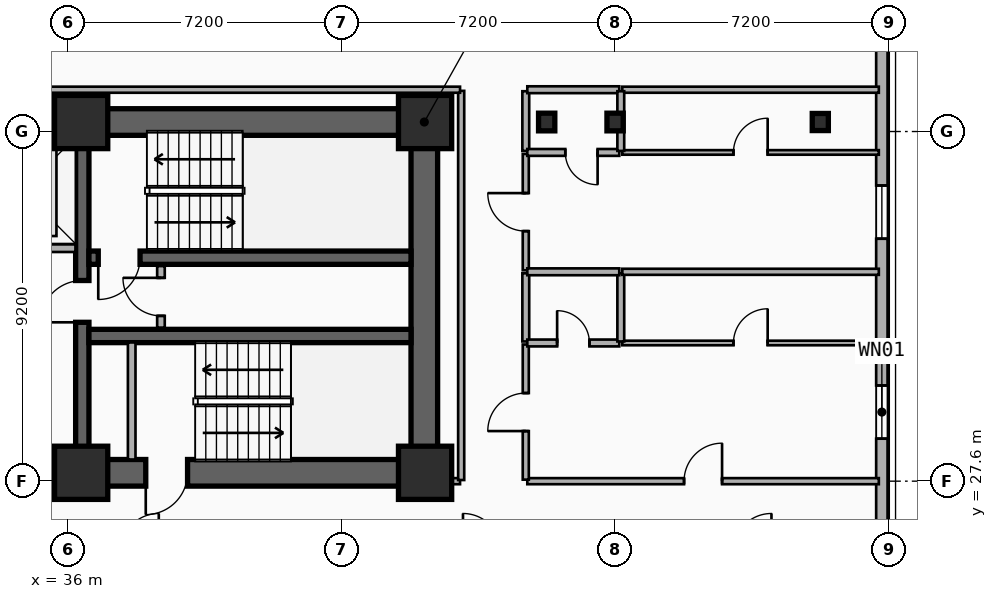
"""IFC4 building model, lengths in metres.
Left out: names, types, materials, properties, quantities, classifications, styles, units other than length and angle.
Written with IfcOpenShell. Run it as: python <this file> out.ifc"""

import sys

from ifc_helpers import new_model, si_unit, direction, frame, frame_2d, origin, origin_2d, place, context, subcontext, project, spatial, rectangle, i_section, extrude, element, fill, save


model = new_model("IFC4")
c1 = context("Model", 3, precision=1e-05, world=origin(), true_north=direction((0.0, 1.0)))
c2 = subcontext(c1, "Body", "Model", "MODEL_VIEW")
j1 = project(units=[si_unit("LENGTHUNIT", "METRE"), si_unit("PLANEANGLEUNIT", "RADIAN")], contexts=[c1])
p1 = place(None, origin())
s1 = spatial("IfcSite", under=j1, at=p1, CompositionType="ELEMENT")
p2 = place(p1, origin())
s2 = spatial("IfcBuilding", under=s1, at=p2, CompositionType="ELEMENT")
p3 = place(p2, frame((0.0, 0.0, 39.5)))
s3 = spatial("IfcBuildingStorey", under=s2, at=p3, CompositionType="ELEMENT", Elevation=39.5)
p4 = place(p3, frame((12.15, 37.05, 0.0), z_axis=(0.0, 0.0, 1.0), x_axis=(1.0, 0.0, 0.0)))
e1 = element("IfcWall", 1, at=p4, inside=s3, PredefinedType="SHEAR", context=c2, shape_type="SweptSolid", body=[
    extrude(rectangle(XDim=33.23, YDim=0.7, at=frame_2d((16.615, 0.0))), origin(), (0.0, 0.0, 1.0), 3.5),
])
p5 = place(p3, frame((45.38, 27.82, 0.0), z_axis=(0.0, 0.0, 1.0), x_axis=(-1.0, 0.0, 0.0)))
e2 = element("IfcWall", 2, at=p5, inside=s3, PredefinedType="SHEAR", context=c2, shape_type="SweptSolid", body=[
    extrude(rectangle(XDim=12.23, YDim=0.7, at=frame_2d((6.115, 0.0))), origin(), (0.0, 0.0, 1.0), 3.5),
])
p6 = place(p5, frame((9.93, 0.0, 0.0)))
e3 = element("IfcOpeningElement", 3, at=p6, cuts=e2, PredefinedType="OPENING", context=c2, shape_type="SweptSolid", body=[
    extrude(rectangle(XDim=1.1, YDim=2.15, at=frame_2d((0.55, 1.075))), frame((0.0, 0.36, 0.0), z_axis=(0.0, -1.0, 0.0), x_axis=(1.0, 0.0, 0.0)), (0.0, 0.0, 1.0), 0.72),
])
p7 = place(p5, frame((6.23, 0.0, 0.0)))
e4 = element("IfcOpeningElement", 4, at=p7, cuts=e2, PredefinedType="OPENING", context=c2, shape_type="SweptSolid", body=[
    extrude(rectangle(XDim=1.1, YDim=2.15, at=frame_2d((0.55, 1.075))), frame((0.0, 0.36, 0.0), z_axis=(0.0, -1.0, 0.0), x_axis=(1.0, 0.0, 0.0)), (0.0, 0.0, 1.0), 0.72),
])
p8 = place(p3, frame((45.38, 28.17, 0.0), z_axis=(0.0, 0.0, 1.0), x_axis=(0.0, 1.0, 0.0)))
e5 = element("IfcWall", 5, at=p8, inside=s3, PredefinedType="SHEAR", context=c2, shape_type="SweptSolid", body=[
    extrude(rectangle(XDim=8.53, YDim=0.7, at=frame_2d((4.265, 0.0))), origin(), (0.0, 0.0, 1.0), 3.5),
])
p9 = place(p3, frame((36.38, 28.17, 0.0), z_axis=(0.0, 0.0, 1.0), x_axis=(0.0, 1.0, 0.0)))
e6 = element("IfcWall", 6, at=p9, inside=s3, PredefinedType="SHEAR", context=c2, shape_type="SweptSolid", body=[
    extrude(rectangle(XDim=8.53, YDim=0.35, at=frame_2d((4.265, 0.0))), origin(), (0.0, 0.0, 1.0), 3.5),
])
p10 = place(p9, frame((3.61, 0.0, 0.0)))
e7 = element("IfcOpeningElement", 7, at=p10, cuts=e6, PredefinedType="OPENING", context=c2, shape_type="SweptSolid", body=[
    extrude(rectangle(XDim=1.1, YDim=2.15, at=frame_2d((0.55, 1.075))), frame((0.0, 0.185, 0.0), z_axis=(0.0, -1.0, 0.0), x_axis=(1.0, 0.0, 0.0)), (0.0, 0.0, 1.0), 0.37),
])
p11 = place(p3, frame((45.03, 33.48, 0.0), z_axis=(0.0, 0.0, 1.0), x_axis=(-1.0, 0.0, 0.0)))
e8 = element("IfcWall", 8, at=p11, inside=s3, PredefinedType="SHEAR", context=c2, shape_type="SweptSolid", body=[
    extrude(rectangle(XDim=8.475, YDim=0.35, at=frame_2d((4.238, 0.0))), origin(), (0.0, 0.0, 1.0), 3.5),
])
p12 = place(p11, frame((7.13, 0.0, 0.0)))
e9 = element("IfcOpeningElement", 9, at=p12, cuts=e8, PredefinedType="OPENING", context=c2, shape_type="SweptSolid", body=[
    extrude(rectangle(XDim=1.1, YDim=2.15, at=frame_2d((0.55, 1.075))), frame((0.0, 0.185, 0.0), z_axis=(0.0, -1.0, 0.0), x_axis=(1.0, 0.0, 0.0)), (0.0, 0.0, 1.0), 0.37),
])
p13 = place(p3, frame((36.555, 31.42, 0.0), z_axis=(0.0, 0.0, 1.0), x_axis=(1.0, 0.0, 0.0)))
e10 = element("IfcWall", 10, at=p13, inside=s3, PredefinedType="SHEAR", context=c2, shape_type="SweptSolid", body=[
    extrude(rectangle(XDim=8.475, YDim=0.35, at=frame_2d((4.238, 0.0))), origin(), (0.0, 0.0, 1.0), 3.5),
])
for number, where, z_axis, x_axis in (
    (11, (36.35, 27.82, 0.0), (0.0, 0.0, 1.0), (1.0, 0.0, 0.0)),
    (12, (36.35, 37.05, 0.0), (0.0, 0.0, 1.0), (1.0, 0.0, 0.0)),
    (13, (45.4, 27.82, 0.0), (0.0, 0.0, 1.0), (1.0, 0.0, 0.0)),
    (14, (45.4, 37.05, 0.0), (0.0, 0.0, 1.0), (1.0, 0.0, 0.0)),
):
    element("IfcColumn", number, at=place(p3, frame(where, z_axis=z_axis, x_axis=x_axis)), inside=s3, PredefinedType="COLUMN", context=c2, shape_type="SweptSolid", body=[
        extrude(rectangle(XDim=1.4, YDim=1.4, at=origin_2d()), origin(), (0.0, 0.0, 1.0), 3.5),
    ])
for number, where, z_axis, x_axis in (
    (15, (48.6, 37.05, 0.0), (0.0, 0.0, 1.0), (1.0, 0.0, 0.0)),
    (16, (50.4, 37.05, 0.0), (0.0, 0.0, 1.0), (1.0, 0.0, 0.0)),
):
    element("IfcColumn", number, at=place(p3, frame(where, z_axis=z_axis, x_axis=x_axis)), inside=s3, PredefinedType="COLUMN", context=c2, shape_type="SweptSolid", body=[
        extrude(i_section(OverallWidth=0.428, OverallDepth=0.465, WebThickness=0.045, FlangeThickness=0.073, FilletRadius=0.015, at=origin_2d()), origin(), (0.0, 0.0, 1.0), 3.5),
    ])
p14 = place(p3, frame((55.8, 37.05, 0.0), z_axis=(0.0, 0.0, 1.0), x_axis=(1.0, 0.0, 0.0)))
e17 = element("IfcColumn", 17, at=p14, inside=s3, PredefinedType="COLUMN", context=c2, shape_type="SweptSolid", body=[
    extrude(i_section(OverallWidth=0.424, OverallDepth=0.45, WebThickness=0.041, FlangeThickness=0.065, FilletRadius=0.015, at=origin_2d()), origin(), (0.0, 0.0, 1.0), 3.5),
])
p15 = place(p3, frame((57.42, 41.0, 0.0), z_axis=(0.0, 0.0, 1.0), x_axis=(0.0, -1.0, 0.0)))
e18 = element("IfcWall", 18, at=p15, inside=s3, PredefinedType="SOLIDWALL", context=c2, shape_type="SweptSolid", body=[
    extrude(rectangle(XDim=15.2, YDim=0.3, at=frame_2d((7.6, 0.0))), origin(), (0.0, 0.0, 1.0), 3.24),
])
p16 = place(p15, frame((10.882, 0.0, 0.48)))
e19 = element("IfcOpeningElement", 19, at=p16, cuts=e18, PredefinedType="OPENING", context=c2, shape_type="SweptSolid", body=[
    extrude(rectangle(XDim=1.4, YDim=1.8, at=frame_2d((0.7, 0.9))), frame((0.0, 0.16, 0.0), z_axis=(0.0, -1.0, 0.0), x_axis=(1.0, 0.0, 0.0)), (0.0, 0.0, 1.0), 0.32),
])
p17 = place(p15, frame((5.621, 0.0, 0.48)))
e20 = element("IfcOpeningElement", 20, at=p17, cuts=e18, PredefinedType="OPENING", context=c2, shape_type="SweptSolid", body=[
    extrude(rectangle(XDim=1.4, YDim=1.8, at=frame_2d((0.7, 0.9))), frame((0.0, 0.16, 0.0), z_axis=(0.0, -1.0, 0.0), x_axis=(1.0, 0.0, 0.0)), (0.0, 0.0, 1.0), 0.32),
])
p18 = place(p3, frame((33.475, 33.73, 0.0), z_axis=(0.0, 0.0, 1.0), x_axis=(1.0, 0.0, 0.0)))
e21 = element("IfcWall", 21, at=p18, inside=s3, PredefinedType="PARTITIONING", context=c2, shape_type="SweptSolid", body=[
    extrude(rectangle(XDim=2.725, YDim=0.2, at=frame_2d((1.362, 0.0))), origin(), (0.0, 0.0, 1.0), 2.212),
])
p19 = place(p18, frame((0.812, 0.0, 0.0)))
e22 = element("IfcOpeningElement", 22, at=p19, cuts=e21, PredefinedType="OPENING", context=c2, shape_type="SweptSolid", body=[
    extrude(rectangle(XDim=1.1, YDim=2.15, at=frame_2d((0.55, 1.075))), frame((0.0, 0.11, 0.0), z_axis=(0.0, -1.0, 0.0), x_axis=(1.0, 0.0, 0.0)), (0.0, 0.0, 1.0), 0.22),
])
p20 = place(p3, frame((37.68, 28.17, 0.0), z_axis=(0.0, 0.0, 1.0), x_axis=(0.0, 1.0, 0.0)))
e23 = element("IfcWall", 23, at=p20, inside=s3, PredefinedType="PARTITIONING", context=c2, shape_type="SweptSolid", body=[
    extrude(rectangle(XDim=3.08, YDim=0.2, at=frame_2d((1.54, 0.0))), origin(), (0.0, 0.0, 1.0), 2.62),
])
p21 = place(p3, frame((38.45, 31.64, 0.0), z_axis=(0.0, 0.0, 1.0), x_axis=(0.0, 1.0, 0.0)))
e24 = element("IfcWall", 24, at=p21, inside=s3, PredefinedType="PARTITIONING", context=c2, shape_type="SweptSolid", body=[
    extrude(rectangle(XDim=1.62, YDim=0.2, at=frame_2d((0.81, 0.0))), origin(), (0.0, 0.0, 1.0), 3.24),
])
p22 = place(p21, frame((0.31, 0.0, 0.0)))
e25 = element("IfcOpeningElement", 25, at=p22, cuts=e24, PredefinedType="OPENING", context=c2, shape_type="SweptSolid", body=[
    extrude(rectangle(XDim=1.0, YDim=2.15, at=frame_2d((0.5, 1.075))), frame((0.0, 0.11, 0.0), z_axis=(0.0, -1.0, 0.0), x_axis=(1.0, 0.0, 0.0)), (0.0, 0.0, 1.0), 0.22),
])
p23 = place(p3, frame((48.09, 27.6, 0.0), z_axis=(0.0, 0.0, 1.0), x_axis=(1.0, 0.0, 0.0)))
e26 = element("IfcWall", 26, at=p23, inside=s3, PredefinedType="PARTITIONING", context=c2, shape_type="SweptSolid", body=[
    extrude(rectangle(XDim=9.25, YDim=0.16, at=frame_2d((4.625, 0.0))), origin(), (0.0, 0.0, 1.0), 2.57),
])
p24 = place(p23, frame((4.125, 0.0, 0.0)))
e27 = element("IfcOpeningElement", 27, at=p24, cuts=e26, PredefinedType="OPENING", context=c2, shape_type="SweptSolid", body=[
    extrude(rectangle(XDim=1.0, YDim=2.15, at=frame_2d((0.5, 1.075))), frame((0.0, 0.09, 0.0), z_axis=(0.0, -1.0, 0.0), x_axis=(1.0, 0.0, 0.0)), (0.0, 0.0, 1.0), 0.18),
])
p25 = place(p3, frame((48.05, 27.64, 0.0), z_axis=(0.0, 0.0, 1.0), x_axis=(0.0, 1.0, 0.0)))
e28 = element("IfcWall", 28, at=p25, inside=s3, PredefinedType="PARTITIONING", context=c2, shape_type="SweptSolid", body=[
    extrude(rectangle(XDim=3.556, YDim=0.16, at=frame_2d((1.778, 0.0))), origin(), (0.0, 0.0, 1.0), 3.24),
])
p26 = place(p25, frame((1.278, 0.0, 0.0)))
e29 = element("IfcOpeningElement", 29, at=p26, cuts=e28, PredefinedType="OPENING", context=c2, shape_type="SweptSolid", body=[
    extrude(rectangle(XDim=1.0, YDim=2.15, at=frame_2d((0.5, 1.075))), frame((0.0, 0.09, 0.0), z_axis=(0.0, -1.0, 0.0), x_axis=(1.0, 0.0, 0.0)), (0.0, 0.0, 1.0), 0.18),
])
p27 = place(p3, frame((48.05, 31.276, 0.0), z_axis=(0.0, 0.0, 1.0), x_axis=(0.0, 1.0, 0.0)))
e30 = element("IfcWall", 30, at=p27, inside=s3, PredefinedType="PLUMBINGWALL", context=c2, shape_type="SweptSolid", body=[
    extrude(rectangle(XDim=1.793, YDim=0.18, at=frame_2d((0.896, 0.0))), origin(), (0.0, 0.0, 1.0), 3.24),
])
p28 = place(p3, frame((48.05, 33.149, 0.0), z_axis=(0.0, 0.0, 1.0), x_axis=(0.0, 1.0, 0.0)))
e31 = element("IfcWall", 31, at=p28, inside=s3, PredefinedType="PARTITIONING", context=c2, shape_type="SweptSolid", body=[
    extrude(rectangle(XDim=3.061, YDim=0.16, at=frame_2d((1.531, 0.0))), origin(), (0.0, 0.0, 1.0), 3.24),
])
p29 = place(p28, frame((1.031, 0.0, 0.0)))
e32 = element("IfcOpeningElement", 32, at=p29, cuts=e31, PredefinedType="OPENING", context=c2, shape_type="SweptSolid", body=[
    extrude(rectangle(XDim=1.0, YDim=2.15, at=frame_2d((0.5, 1.075))), frame((0.0, 0.09, 0.0), z_axis=(0.0, -1.0, 0.0), x_axis=(1.0, 0.0, 0.0)), (0.0, 0.0, 1.0), 0.18),
])
p30 = place(p3, frame((48.05, 36.29, 0.0), z_axis=(0.0, 0.0, 1.0), x_axis=(0.0, 1.0, 0.0)))
e33 = element("IfcWall", 33, at=p30, inside=s3, PredefinedType="PLUMBINGWALL", context=c2, shape_type="SweptSolid", body=[
    extrude(rectangle(XDim=1.57, YDim=0.18, at=frame_2d((0.785, 0.0))), origin(), (0.0, 0.0, 1.0), 2.72),
])
p31 = place(p3, frame((48.09, 37.9, 0.0), z_axis=(0.0, 0.0, 1.0), x_axis=(1.0, 0.0, 0.0)))
e34 = element("IfcWall", 34, at=p31, inside=s3, PredefinedType="PLUMBINGWALL", context=c2, shape_type="SweptSolid", body=[
    extrude(rectangle(XDim=2.42, YDim=0.18, at=frame_2d((1.21, 0.0))), origin(), (0.0, 0.0, 1.0), 3.24),
])
p32 = place(p3, frame((50.59, 37.9, 0.0), z_axis=(0.0, 0.0, 1.0), x_axis=(1.0, 0.0, 0.0)))
e35 = element("IfcWall", 35, at=p32, inside=s3, PredefinedType="PARTITIONING", context=c2, shape_type="SweptSolid", body=[
    extrude(rectangle(XDim=6.75, YDim=0.16, at=frame_2d((3.375, 0.0))), origin(), (0.0, 0.0, 1.0), 3.24),
])
p33 = place(p3, frame((48.09, 31.236, 0.0), z_axis=(0.0, 0.0, 1.0), x_axis=(1.0, 0.0, 0.0)))
e36 = element("IfcWall", 36, at=p33, inside=s3, PredefinedType="PLUMBINGWALL", context=c2, shape_type="SweptSolid", body=[
    extrude(rectangle(XDim=2.42, YDim=0.18, at=frame_2d((1.21, 0.0))), origin(), (0.0, 0.0, 1.0), 2.57),
])
p34 = place(p33, frame((0.785, 0.0, 0.0)))
e37 = element("IfcOpeningElement", 37, at=p34, cuts=e36, PredefinedType="OPENING", context=c2, shape_type="SweptSolid", body=[
    extrude(rectangle(XDim=0.85, YDim=2.1, at=frame_2d((0.425, 1.05))), frame((0.0, 0.1, 0.0), z_axis=(0.0, -1.0, 0.0), x_axis=(1.0, 0.0, 0.0)), (0.0, 0.0, 1.0), 0.2),
])
p35 = place(p3, frame((50.59, 31.236, 0.0), z_axis=(0.0, 0.0, 1.0), x_axis=(1.0, 0.0, 0.0)))
e38 = element("IfcWall", 38, at=p35, inside=s3, PredefinedType="PARTITIONING", context=c2, shape_type="SweptSolid", body=[
    extrude(rectangle(XDim=6.75, YDim=0.12, at=frame_2d((3.375, 0.0))), origin(), (0.0, 0.0, 1.0), 2.57),
])
p36 = place(p35, frame((2.925, 0.0, 0.0)))
e39 = element("IfcOpeningElement", 39, at=p36, cuts=e38, PredefinedType="OPENING", context=c2, shape_type="SweptSolid", body=[
    extrude(rectangle(XDim=0.9, YDim=2.1, at=frame_2d((0.45, 1.05))), frame((0.0, 0.07, 0.0), z_axis=(0.0, -1.0, 0.0), x_axis=(1.0, 0.0, 0.0)), (0.0, 0.0, 1.0), 0.14),
])
p37 = place(p3, frame((50.55, 31.276, 0.0), z_axis=(0.0, 0.0, 1.0), x_axis=(0.0, 1.0, 0.0)))
e40 = element("IfcWall", 40, at=p37, inside=s3, PredefinedType="PLUMBINGWALL", context=c2, shape_type="SweptSolid", body=[
    extrude(rectangle(XDim=1.793, YDim=0.18, at=frame_2d((0.896, 0.0))), origin(), (0.0, 0.0, 1.0), 2.57),
])
p38 = place(p3, frame((48.09, 33.109, 0.0), z_axis=(0.0, 0.0, 1.0), x_axis=(1.0, 0.0, 0.0)))
e41 = element("IfcWall", 41, at=p38, inside=s3, PredefinedType="PLUMBINGWALL", context=c2, shape_type="SweptSolid", body=[
    extrude(rectangle(XDim=2.42, YDim=0.18, at=frame_2d((1.21, 0.0))), origin(), (0.0, 0.0, 1.0), 2.57),
])
p39 = place(p3, frame((50.59, 33.109, 0.0), z_axis=(0.0, 0.0, 1.0), x_axis=(1.0, 0.0, 0.0)))
e42 = element("IfcWall", 42, at=p39, inside=s3, PredefinedType="PARTITIONING", context=c2, shape_type="SweptSolid", body=[
    extrude(rectangle(XDim=6.75, YDim=0.16, at=frame_2d((3.375, 0.0))), origin(), (0.0, 0.0, 1.0), 2.57),
])
p40 = place(p3, frame((50.51, 36.25, 0.0), z_axis=(0.0, 0.0, 1.0), x_axis=(-1.0, 0.0, 0.0)))
e43 = element("IfcWall", 43, at=p40, inside=s3, PredefinedType="PLUMBINGWALL", context=c2, shape_type="SweptSolid", body=[
    extrude(rectangle(XDim=2.42, YDim=0.18, at=frame_2d((1.21, 0.0))), origin(), (0.0, 0.0, 1.0), 2.57),
])
p41 = place(p40, frame((0.57, 0.0, 0.0)))
e44 = element("IfcOpeningElement", 44, at=p41, cuts=e43, PredefinedType="OPENING", context=c2, shape_type="SweptSolid", body=[
    extrude(rectangle(XDim=0.85, YDim=2.1, at=frame_2d((0.425, 1.05))), frame((0.0, 0.1, 0.0), z_axis=(0.0, -1.0, 0.0), x_axis=(1.0, 0.0, 0.0)), (0.0, 0.0, 1.0), 0.2),
])
p42 = place(p3, frame((50.59, 36.25, 0.0), z_axis=(0.0, 0.0, 1.0), x_axis=(1.0, 0.0, 0.0)))
e45 = element("IfcWall", 45, at=p42, inside=s3, PredefinedType="PARTITIONING", context=c2, shape_type="SweptSolid", body=[
    extrude(rectangle(XDim=6.75, YDim=0.12, at=frame_2d((3.375, 0.0))), origin(), (0.0, 0.0, 1.0), 2.57),
])
p43 = place(p42, frame((2.925, 0.0, 0.0)))
e46 = element("IfcOpeningElement", 46, at=p43, cuts=e45, PredefinedType="OPENING", context=c2, shape_type="SweptSolid", body=[
    extrude(rectangle(XDim=0.9, YDim=2.1, at=frame_2d((0.45, 1.05))), frame((0.0, 0.07, 0.0), z_axis=(0.0, -1.0, 0.0), x_axis=(1.0, 0.0, 0.0)), (0.0, 0.0, 1.0), 0.14),
])
p44 = place(p3, frame((50.55, 36.29, 0.0), z_axis=(0.0, 0.0, 1.0), x_axis=(0.0, 1.0, 0.0)))
e47 = element("IfcWall", 47, at=p44, inside=s3, PredefinedType="PLUMBINGWALL", context=c2, shape_type="SweptSolid", body=[
    extrude(rectangle(XDim=1.57, YDim=0.18, at=frame_2d((0.785, 0.0))), origin(), (0.0, 0.0, 1.0), 2.57),
])
p45 = place(p3, frame((45.41, 27.6, 0.0), z_axis=(0.0, 0.0, 1.0), x_axis=(1.0, 0.0, 0.0)))
e48 = element("IfcWall", 48, at=p45, inside=s3, PredefinedType="PARTITIONING", context=c2, shape_type="SweptSolid", body=[
    extrude(rectangle(XDim=0.91, YDim=0.16, at=frame_2d((0.455, 0.0))), origin(), (0.0, 0.0, 1.0), 2.28),
])
p46 = place(p3, frame((46.35, 27.63, 0.0), z_axis=(0.0, 0.0, 1.0), x_axis=(0.0, 1.0, 0.0)))
e49 = element("IfcWall", 49, at=p46, inside=s3, PredefinedType="PARTITIONING", context=c2, shape_type="SweptSolid", body=[
    extrude(rectangle(XDim=10.24, YDim=0.16, at=frame_2d((5.12, 0.0))), origin(), (0.0, 0.0, 1.0), 2.72),
])
p47 = place(p3, frame((11.28, 37.9, 0.0), z_axis=(0.0, 0.0, 1.0), x_axis=(1.0, 0.0, 0.0)))
e50 = element("IfcWall", 50, at=p47, inside=s3, PredefinedType="PARTITIONING", context=c2, shape_type="SweptSolid", body=[
    extrude(rectangle(XDim=35.04, YDim=0.16, at=frame_2d((17.52, 0.0))), origin(), (0.0, 0.0, 1.0), 3.24),
])
p48 = place(p16, origin())
e51 = element("IfcWindow", 51, at=p48, inside=s3, PartitioningType="SINGLE_PANEL", PredefinedType="WINDOW", context=c2, shape_type="SweptSolid", body=[
    extrude(rectangle(XDim=1.4, YDim=1.8, at=frame_2d((0.7, 0.9))), frame((0.0, 0.03, 0.0), z_axis=(0.0, -1.0, 0.0), x_axis=(1.0, 0.0, 0.0)), (0.0, 0.0, 1.0), 0.06),
])
fill(e19, e51)
p49 = place(p17, origin())
e52 = element("IfcWindow", 52, at=p49, inside=s3, PartitioningType="SINGLE_PANEL", PredefinedType="WINDOW", context=c2, shape_type="SweptSolid", body=[
    extrude(rectangle(XDim=1.4, YDim=1.8, at=frame_2d((0.7, 0.9))), frame((0.0, 0.03, 0.0), z_axis=(0.0, -1.0, 0.0), x_axis=(1.0, 0.0, 0.0)), (0.0, 0.0, 1.0), 0.06),
])
fill(e20, e52)
p50 = place(p12, origin())
e53 = element("IfcDoor", 53, at=p50, inside=s3, OperationType="SINGLE_SWING_RIGHT", PredefinedType="DOOR", context=c2, shape_type="SweptSolid", body=[
    extrude(rectangle(XDim=1.1, YDim=2.15, at=frame_2d((0.55, 1.075))), frame((0.0, 0.025, 0.0), z_axis=(0.0, -1.0, 0.0), x_axis=(1.0, 0.0, 0.0)), (0.0, 0.0, 1.0), 0.05),
])
fill(e9, e53)
p51 = place(p10, origin())
e54 = element("IfcDoor", 54, at=p51, inside=s3, OperationType="SINGLE_SWING_LEFT", PredefinedType="DOOR", context=c2, shape_type="SweptSolid", body=[
    extrude(rectangle(XDim=1.1, YDim=2.15, at=frame_2d((0.55, 1.075))), frame((0.0, 0.025, 0.0), z_axis=(0.0, -1.0, 0.0), x_axis=(1.0, 0.0, 0.0)), (0.0, 0.0, 1.0), 0.05),
])
fill(e7, e54)
p52 = place(p7, origin())
e55 = element("IfcDoor", 55, at=p52, inside=s3, OperationType="SINGLE_SWING_RIGHT", PredefinedType="DOOR", context=c2, shape_type="SweptSolid", body=[
    extrude(rectangle(XDim=1.1, YDim=2.15, at=frame_2d((0.55, 1.075))), frame((0.0, 0.025, 0.0), z_axis=(0.0, -1.0, 0.0), x_axis=(1.0, 0.0, 0.0)), (0.0, 0.0, 1.0), 0.05),
])
fill(e4, e55)
p53 = place(p22, origin())
e56 = element("IfcDoor", 56, at=p53, inside=s3, OperationType="SINGLE_SWING_RIGHT", PredefinedType="DOOR", context=c2, shape_type="SweptSolid", body=[
    extrude(rectangle(XDim=1.0, YDim=2.15, at=frame_2d((0.5, 1.075))), frame((0.0, 0.025, 0.0), z_axis=(0.0, -1.0, 0.0), x_axis=(1.0, 0.0, 0.0)), (0.0, 0.0, 1.0), 0.05),
])
fill(e25, e56)
p54 = place(p24, origin())
e57 = element("IfcDoor", 57, at=p54, inside=s3, OperationType="SINGLE_SWING_RIGHT", PredefinedType="DOOR", context=c2, shape_type="SweptSolid", body=[
    extrude(rectangle(XDim=1.0, YDim=2.15, at=frame_2d((0.5, 1.075))), frame((0.0, 0.025, 0.0), z_axis=(0.0, -1.0, 0.0), x_axis=(1.0, 0.0, 0.0)), (0.0, 0.0, 1.0), 0.05),
])
fill(e27, e57)
p55 = place(p26, origin())
e58 = element("IfcDoor", 58, at=p55, inside=s3, OperationType="SINGLE_SWING_LEFT", PredefinedType="DOOR", context=c2, shape_type="SweptSolid", body=[
    extrude(rectangle(XDim=1.0, YDim=2.15, at=frame_2d((0.5, 1.075))), frame((0.0, 0.025, 0.0), z_axis=(0.0, -1.0, 0.0), x_axis=(1.0, 0.0, 0.0)), (0.0, 0.0, 1.0), 0.05),
])
fill(e29, e58)
p56 = place(p29, origin())
e59 = element("IfcDoor", 59, at=p56, inside=s3, OperationType="SINGLE_SWING_RIGHT", PredefinedType="DOOR", context=c2, shape_type="SweptSolid", body=[
    extrude(rectangle(XDim=1.0, YDim=2.15, at=frame_2d((0.5, 1.075))), frame((0.0, 0.025, 0.0), z_axis=(0.0, -1.0, 0.0), x_axis=(1.0, 0.0, 0.0)), (0.0, 0.0, 1.0), 0.05),
])
fill(e32, e59)
p57 = place(p34, origin())
e60 = element("IfcDoor", 60, at=p57, inside=s3, OperationType="SINGLE_SWING_LEFT", PredefinedType="DOOR", context=c2, shape_type="SweptSolid", body=[
    extrude(rectangle(XDim=0.85, YDim=2.1, at=frame_2d((0.425, 1.05))), frame((0.0, 0.025, 0.0), z_axis=(0.0, -1.0, 0.0), x_axis=(1.0, 0.0, 0.0)), (0.0, 0.0, 1.0), 0.05),
])
fill(e37, e60)
p58 = place(p36, origin())
e61 = element("IfcDoor", 61, at=p58, inside=s3, OperationType="SINGLE_SWING_RIGHT", PredefinedType="DOOR", context=c2, shape_type="SweptSolid", body=[
    extrude(rectangle(XDim=0.9, YDim=2.1, at=frame_2d((0.45, 1.05))), frame((0.0, 0.025, 0.0), z_axis=(0.0, -1.0, 0.0), x_axis=(1.0, 0.0, 0.0)), (0.0, 0.0, 1.0), 0.05),
])
fill(e39, e61)
p59 = place(p41, origin())
e62 = element("IfcDoor", 62, at=p59, inside=s3, OperationType="SINGLE_SWING_LEFT", PredefinedType="DOOR", context=c2, shape_type="SweptSolid", body=[
    extrude(rectangle(XDim=0.85, YDim=2.1, at=frame_2d((0.425, 1.05))), frame((0.0, 0.025, 0.0), z_axis=(0.0, -1.0, 0.0), x_axis=(1.0, 0.0, 0.0)), (0.0, 0.0, 1.0), 0.05),
])
fill(e44, e62)
p60 = place(p43, origin())
e63 = element("IfcDoor", 63, at=p60, inside=s3, OperationType="SINGLE_SWING_RIGHT", PredefinedType="DOOR", context=c2, shape_type="SweptSolid", body=[
    extrude(rectangle(XDim=0.9, YDim=2.1, at=frame_2d((0.45, 1.05))), frame((0.0, 0.025, 0.0), z_axis=(0.0, -1.0, 0.0), x_axis=(1.0, 0.0, 0.0)), (0.0, 0.0, 1.0), 0.05),
])
fill(e46, e63)
save(model, sys.argv[1])
